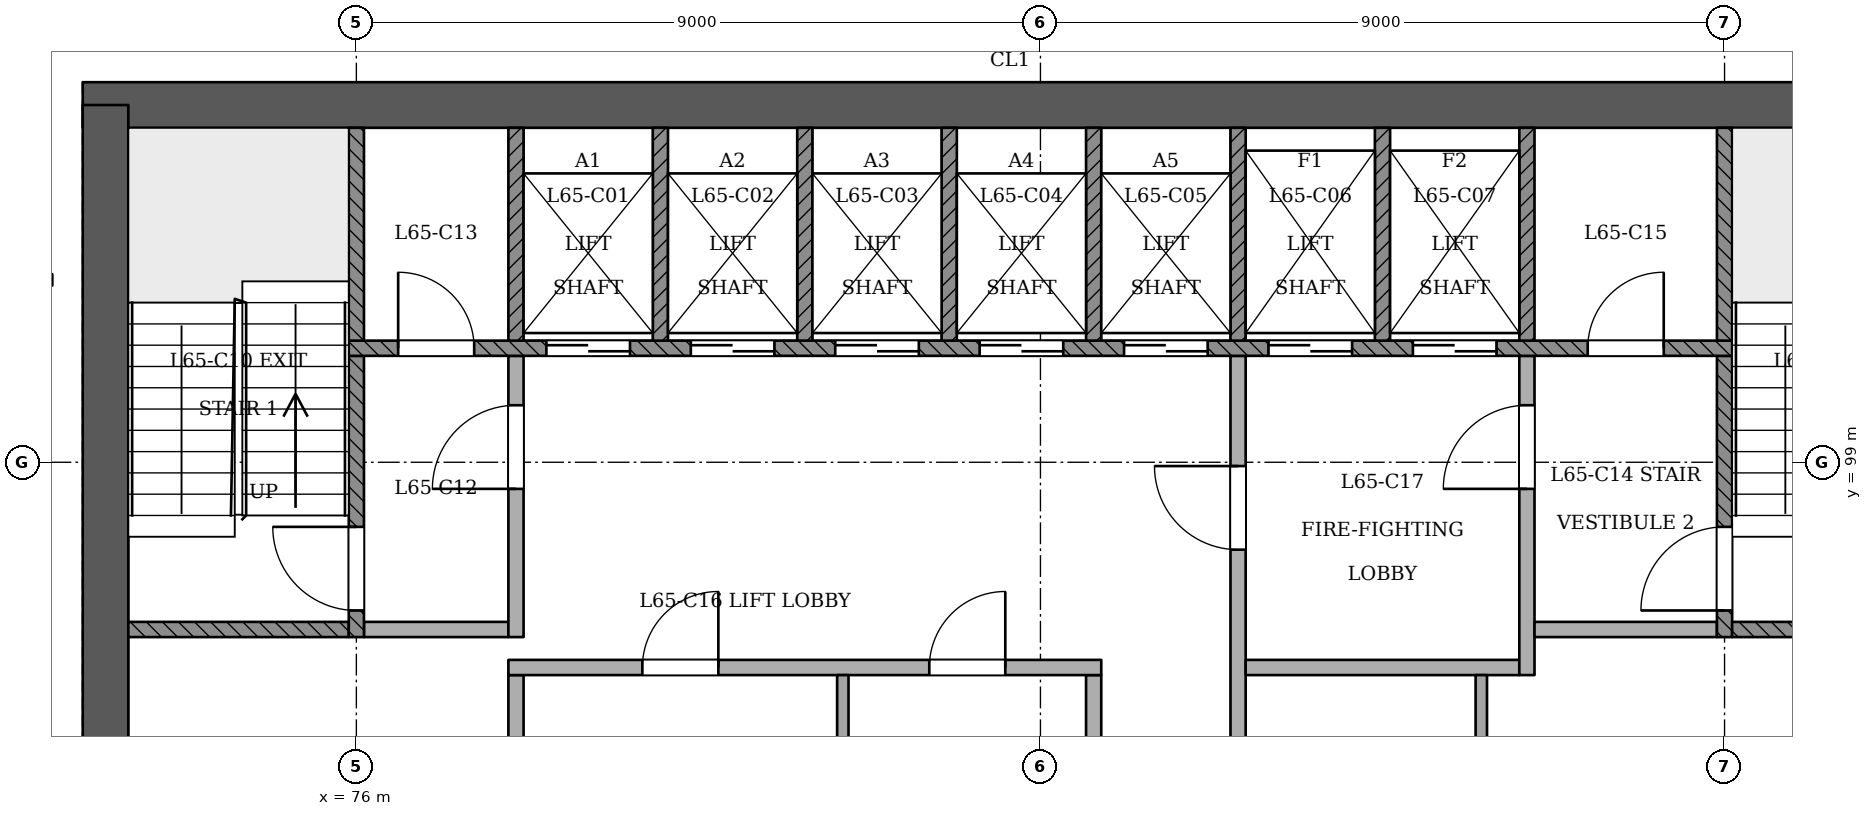
"""IFC4 building model, lengths in metres.
Left out: names, types, materials, properties, quantities, classifications, styles, units other than length and angle.
Written with IfcOpenShell. Run it as: python <this file> out.ifc"""

import sys

from ifc_helpers import new_model, si_unit, direction, frame, frame_2d, origin, place, context, subcontext, project, spatial, rectangle, extrude, element, fill, save


model = new_model("IFC4")
c1 = context("Model", 3, precision=1e-05, world=origin(), true_north=direction((0.0, 1.0)))
c2 = subcontext(c1, "Body", "Model", "MODEL_VIEW")
j1 = project(units=[si_unit("LENGTHUNIT", "METRE"), si_unit("PLANEANGLEUNIT", "RADIAN")], contexts=[c1])
p1 = place(None, origin())
s1 = spatial("IfcSite", under=j1, at=p1, CompositionType="ELEMENT")
p2 = place(p1, origin())
s2 = spatial("IfcBuilding", under=s1, at=p2, CompositionType="ELEMENT")
p3 = place(p2, frame((0.0, 0.0, 253.6)))
s3 = spatial("IfcBuildingStorey", under=s2, at=p3, CompositionType="ELEMENT", Elevation=253.6)
p4 = place(p3, frame((97.3, 103.7, 0.0), z_axis=(0.0, 0.0, 1.0), x_axis=(-1.0, 0.0, 0.0)))
e1 = element("IfcWall", 1, at=p4, inside=s3, PredefinedType="SHEAR", context=c2, shape_type="SweptSolid", body=[
    extrude(rectangle(XDim=24.9, YDim=0.6, at=frame_2d((12.45, 0.0))), origin(), (0.0, 0.0, 1.0), 3.6),
])
p5 = place(p3, frame((72.7, 103.7, 0.0), z_axis=(0.0, 0.0, 1.0), x_axis=(0.0, -1.0, 0.0)))
e2 = element("IfcWall", 2, at=p5, inside=s3, PredefinedType="SHEAR", context=c2, shape_type="SweptSolid", body=[
    extrude(rectangle(XDim=10.9, YDim=0.6, at=frame_2d((5.45, 0.0))), origin(), (0.0, 0.0, 1.0), 3.6),
])
p6 = place(p3, frame((72.0, 101.4, 0.0), z_axis=(0.0, 0.0, 1.0), x_axis=(-1.0, 0.0, 0.0)))
e3 = element("IfcWall", 3, at=p6, inside=s3, PredefinedType="PARTITIONING", context=c2, shape_type="SweptSolid", body=[
    extrude(rectangle(XDim=1.8, YDim=0.15, at=frame_2d((0.9, 0.0))), origin(), (0.0, 0.0, 1.0), 3.2),
])
p7 = place(p6, frame((0.54, 0.0, 0.0)))
e4 = element("IfcOpeningElement", 4, at=p7, cuts=e3, PredefinedType="OPENING", context=c2, shape_type="SweptSolid", body=[
    extrude(rectangle(XDim=1.0, YDim=2.1, at=frame_2d((0.5, 1.05))), frame((0.0, 0.085, 0.0), z_axis=(0.0, -1.0, 0.0), x_axis=(1.0, 0.0, 0.0)), (0.0, 0.0, 1.0), 0.171),
])
p8 = place(p3, frame((78.1, 93.4, 0.0), z_axis=(0.0, 0.0, 1.0), x_axis=(0.0, 1.0, 0.0)))
e5 = element("IfcWall", 5, at=p8, inside=s3, PredefinedType="PARTITIONING", context=c2, shape_type="SweptSolid", body=[
    extrude(rectangle(XDim=2.8, YDim=0.2, at=frame_2d((1.4, 0.0))), origin(), (0.0, 0.0, 1.0), 3.2),
])
p9 = place(p3, frame((82.4, 93.4, 0.0), z_axis=(0.0, 0.0, 1.0), x_axis=(0.0, 1.0, 0.0)))
e6 = element("IfcWall", 6, at=p9, inside=s3, PredefinedType="PARTITIONING", context=c2, shape_type="SweptSolid", body=[
    extrude(rectangle(XDim=2.8, YDim=0.15, at=frame_2d((1.4, 0.0))), origin(), (0.0, 0.0, 1.0), 3.2),
])
p10 = place(p3, frame((85.7, 93.4, 0.0), z_axis=(0.0, 0.0, 1.0), x_axis=(0.0, 1.0, 0.0)))
e7 = element("IfcWall", 7, at=p10, inside=s3, PredefinedType="PARTITIONING", context=c2, shape_type="SweptSolid", body=[
    extrude(rectangle(XDim=2.8, YDim=0.2, at=frame_2d((1.4, 0.0))), origin(), (0.0, 0.0, 1.0), 3.2),
])
p11 = place(p3, frame((87.6, 93.4, 0.0), z_axis=(0.0, 0.0, 1.0), x_axis=(0.0, 1.0, 0.0)))
e8 = element("IfcWall", 8, at=p11, inside=s3, PredefinedType="PARTITIONING", context=c2, shape_type="SweptSolid", body=[
    extrude(rectangle(XDim=7.0, YDim=0.2, at=frame_2d((3.5, 0.0))), origin(), (0.0, 0.0, 1.0), 3.2),
])
p12 = place(p11, frame((4.45, 0.0, 0.0)))
e9 = element("IfcOpeningElement", 9, at=p12, cuts=e8, PredefinedType="OPENING", context=c2, shape_type="SweptSolid", body=[
    extrude(rectangle(XDim=1.1, YDim=2.1, at=frame_2d((0.55, 1.05))), frame((0.0, 0.11, 0.0), z_axis=(0.0, -1.0, 0.0), x_axis=(1.0, 0.0, 0.0)), (0.0, 0.0, 1.0), 0.221),
])
p13 = place(p3, frame((90.8, 93.4, 0.0), z_axis=(0.0, 0.0, 1.0), x_axis=(0.0, 1.0, 0.0)))
e10 = element("IfcWall", 10, at=p13, inside=s3, PredefinedType="PARTITIONING", context=c2, shape_type="SweptSolid", body=[
    extrude(rectangle(XDim=2.8, YDim=0.15, at=frame_2d((1.4, 0.0))), origin(), (0.0, 0.0, 1.0), 3.2),
])
p14 = place(p3, frame((78.0, 96.3, 0.0), z_axis=(0.0, 0.0, 1.0), x_axis=(1.0, 0.0, 0.0)))
e11 = element("IfcWall", 11, at=p14, inside=s3, PredefinedType="PARTITIONING", context=c2, shape_type="SweptSolid", body=[
    extrude(rectangle(XDim=7.8, YDim=0.2, at=frame_2d((3.9, 0.0))), origin(), (0.0, 0.0, 1.0), 3.2),
])
p15 = place(p14, frame((1.762, 0.0, 0.0)))
e12 = element("IfcOpeningElement", 12, at=p15, cuts=e11, PredefinedType="OPENING", context=c2, shape_type="SweptSolid", body=[
    extrude(rectangle(XDim=1.0, YDim=2.1, at=frame_2d((0.5, 1.05))), frame((0.0, 0.11, 0.0), z_axis=(0.0, -1.0, 0.0), x_axis=(1.0, 0.0, 0.0)), (0.0, 0.0, 1.0), 0.221),
])
p16 = place(p14, frame((5.538, 0.0, 0.0)))
e13 = element("IfcOpeningElement", 13, at=p16, cuts=e11, PredefinedType="OPENING", context=c2, shape_type="SweptSolid", body=[
    extrude(rectangle(XDim=1.0, YDim=2.1, at=frame_2d((0.5, 1.05))), frame((0.0, 0.11, 0.0), z_axis=(0.0, -1.0, 0.0), x_axis=(1.0, 0.0, 0.0)), (0.0, 0.0, 1.0), 0.221),
])
p17 = place(p3, frame((87.7, 96.3, 0.0), z_axis=(0.0, 0.0, 1.0), x_axis=(1.0, 0.0, 0.0)))
e14 = element("IfcWall", 14, at=p17, inside=s3, PredefinedType="PARTITIONING", context=c2, shape_type="SweptSolid", body=[
    extrude(rectangle(XDim=3.6, YDim=0.2, at=frame_2d((1.8, 0.0))), origin(), (0.0, 0.0, 1.0), 3.2),
])
p18 = place(p3, frame((91.4, 96.2, 0.0), z_axis=(0.0, 0.0, 1.0), x_axis=(0.0, 1.0, 0.0)))
e15 = element("IfcWall", 15, at=p18, inside=s3, PredefinedType="PARTITIONING", context=c2, shape_type="SweptSolid", body=[
    extrude(rectangle(XDim=4.2, YDim=0.2, at=frame_2d((2.1, 0.0))), origin(), (0.0, 0.0, 1.0), 3.2),
])
p19 = place(p18, frame((2.45, 0.0, 0.0)))
e16 = element("IfcOpeningElement", 16, at=p19, cuts=e15, PredefinedType="OPENING", context=c2, shape_type="SweptSolid", body=[
    extrude(rectangle(XDim=1.1, YDim=2.1, at=frame_2d((0.55, 1.05))), frame((0.0, 0.11, 0.0), z_axis=(0.0, -1.0, 0.0), x_axis=(1.0, 0.0, 0.0)), (0.0, 0.0, 1.0), 0.221),
])
p20 = place(p3, frame((73.0, 96.8, 0.0), z_axis=(0.0, 0.0, 1.0), x_axis=(1.0, 0.0, 0.0)))
e17 = element("IfcWall", 17, at=p20, inside=s3, PredefinedType="SOLIDWALL", context=c2, shape_type="SweptSolid", body=[
    extrude(rectangle(XDim=2.9, YDim=0.2, at=frame_2d((1.45, 0.0))), origin(), (0.0, 0.0, 1.0), 3.2),
])
p21 = place(p3, frame((76.0, 96.7, 0.0), z_axis=(0.0, 0.0, 1.0), x_axis=(0.0, 1.0, 0.0)))
e18 = element("IfcWall", 18, at=p21, inside=s3, PredefinedType="SOLIDWALL", context=c2, shape_type="SweptSolid", body=[
    extrude(rectangle(XDim=3.7, YDim=0.2, at=frame_2d((1.85, 0.0))), origin(), (0.0, 0.0, 1.0), 3.2),
])
p22 = place(p21, frame((0.35, 0.0, 0.0)))
e19 = element("IfcOpeningElement", 19, at=p22, cuts=e18, PredefinedType="OPENING", context=c2, shape_type="SweptSolid", body=[
    extrude(rectangle(XDim=1.1, YDim=2.1, at=frame_2d((0.55, 1.05))), frame((0.0, 0.11, 0.0), z_axis=(0.0, -1.0, 0.0), x_axis=(1.0, 0.0, 0.0)), (0.0, 0.0, 1.0), 0.221),
])
p23 = place(p3, frame((76.1, 96.8, 0.0), z_axis=(0.0, 0.0, 1.0), x_axis=(1.0, 0.0, 0.0)))
e20 = element("IfcWall", 20, at=p23, inside=s3, PredefinedType="PARTITIONING", context=c2, shape_type="SweptSolid", body=[
    extrude(rectangle(XDim=1.9, YDim=0.2, at=frame_2d((0.95, 0.0))), origin(), (0.0, 0.0, 1.0), 3.2),
])
p24 = place(p3, frame((78.1, 96.7, 0.0), z_axis=(0.0, 0.0, 1.0), x_axis=(0.0, 1.0, 0.0)))
e21 = element("IfcWall", 21, at=p24, inside=s3, PredefinedType="PARTITIONING", context=c2, shape_type="SweptSolid", body=[
    extrude(rectangle(XDim=3.7, YDim=0.2, at=frame_2d((1.85, 0.0))), origin(), (0.0, 0.0, 1.0), 3.2),
])
p25 = place(p24, frame((1.95, 0.0, 0.0)))
e22 = element("IfcOpeningElement", 22, at=p25, cuts=e21, PredefinedType="OPENING", context=c2, shape_type="SweptSolid", body=[
    extrude(rectangle(XDim=1.1, YDim=2.1, at=frame_2d((0.55, 1.05))), frame((0.0, 0.11, 0.0), z_axis=(0.0, -1.0, 0.0), x_axis=(1.0, 0.0, 0.0)), (0.0, 0.0, 1.0), 0.221),
])
p26 = place(p3, frame((91.5, 96.8, 0.0), z_axis=(0.0, 0.0, 1.0), x_axis=(1.0, 0.0, 0.0)))
e23 = element("IfcWall", 23, at=p26, inside=s3, PredefinedType="PARTITIONING", context=c2, shape_type="SweptSolid", body=[
    extrude(rectangle(XDim=2.4, YDim=0.2, at=frame_2d((1.2, 0.0))), origin(), (0.0, 0.0, 1.0), 3.2),
])
p27 = place(p3, frame((94.0, 96.7, 0.0), z_axis=(0.0, 0.0, 1.0), x_axis=(0.0, 1.0, 0.0)))
e24 = element("IfcWall", 24, at=p27, inside=s3, PredefinedType="SOLIDWALL", context=c2, shape_type="SweptSolid", body=[
    extrude(rectangle(XDim=3.7, YDim=0.2, at=frame_2d((1.85, 0.0))), origin(), (0.0, 0.0, 1.0), 3.2),
])
p28 = place(p27, frame((0.35, 0.0, 0.0)))
e25 = element("IfcOpeningElement", 25, at=p28, cuts=e24, PredefinedType="OPENING", context=c2, shape_type="SweptSolid", body=[
    extrude(rectangle(XDim=1.1, YDim=2.1, at=frame_2d((0.55, 1.05))), frame((0.0, 0.11, 0.0), z_axis=(0.0, -1.0, 0.0), x_axis=(1.0, 0.0, 0.0)), (0.0, 0.0, 1.0), 0.221),
])
p29 = place(p3, frame((94.1, 96.8, 0.0), z_axis=(0.0, 0.0, 1.0), x_axis=(1.0, 0.0, 0.0)))
e26 = element("IfcWall", 26, at=p29, inside=s3, PredefinedType="SOLIDWALL", context=c2, shape_type="SweptSolid", body=[
    extrude(rectangle(XDim=2.9, YDim=0.2, at=frame_2d((1.45, 0.0))), origin(), (0.0, 0.0, 1.0), 3.2),
])
p30 = place(p3, frame((75.9, 100.5, 0.0), z_axis=(0.0, 0.0, 1.0), x_axis=(1.0, 0.0, 0.0)))
e27 = element("IfcWall", 27, at=p30, inside=s3, PredefinedType="SOLIDWALL", context=c2, shape_type="SweptSolid", body=[
    extrude(rectangle(XDim=18.2, YDim=0.2, at=frame_2d((9.1, 0.0))), origin(), (0.0, 0.0, 1.0), 3.2),
])
p31 = place(p30, frame((2.6, 0.0, 0.0)))
e28 = element("IfcOpeningElement", 28, at=p31, cuts=e27, PredefinedType="OPENING", context=c2, shape_type="SweptSolid", body=[
    extrude(rectangle(XDim=1.1, YDim=2.1, at=frame_2d((0.55, 1.05))), frame((0.0, 0.11, 0.0), z_axis=(0.0, -1.0, 0.0), x_axis=(1.0, 0.0, 0.0)), (0.0, 0.0, 1.0), 0.221),
])
p32 = place(p30, frame((4.5, 0.0, 0.0)))
e29 = element("IfcOpeningElement", 29, at=p32, cuts=e27, PredefinedType="OPENING", context=c2, shape_type="SweptSolid", body=[
    extrude(rectangle(XDim=1.1, YDim=2.1, at=frame_2d((0.55, 1.05))), frame((0.0, 0.11, 0.0), z_axis=(0.0, -1.0, 0.0), x_axis=(1.0, 0.0, 0.0)), (0.0, 0.0, 1.0), 0.221),
])
p33 = place(p30, frame((6.4, 0.0, 0.0)))
e30 = element("IfcOpeningElement", 30, at=p33, cuts=e27, PredefinedType="OPENING", context=c2, shape_type="SweptSolid", body=[
    extrude(rectangle(XDim=1.1, YDim=2.1, at=frame_2d((0.55, 1.05))), frame((0.0, 0.11, 0.0), z_axis=(0.0, -1.0, 0.0), x_axis=(1.0, 0.0, 0.0)), (0.0, 0.0, 1.0), 0.221),
])
p34 = place(p30, frame((8.3, 0.0, 0.0)))
e31 = element("IfcOpeningElement", 31, at=p34, cuts=e27, PredefinedType="OPENING", context=c2, shape_type="SweptSolid", body=[
    extrude(rectangle(XDim=1.1, YDim=2.1, at=frame_2d((0.55, 1.05))), frame((0.0, 0.11, 0.0), z_axis=(0.0, -1.0, 0.0), x_axis=(1.0, 0.0, 0.0)), (0.0, 0.0, 1.0), 0.221),
])
p35 = place(p30, frame((10.2, 0.0, 0.0)))
e32 = element("IfcOpeningElement", 32, at=p35, cuts=e27, PredefinedType="OPENING", context=c2, shape_type="SweptSolid", body=[
    extrude(rectangle(XDim=1.1, YDim=2.1, at=frame_2d((0.55, 1.05))), frame((0.0, 0.11, 0.0), z_axis=(0.0, -1.0, 0.0), x_axis=(1.0, 0.0, 0.0)), (0.0, 0.0, 1.0), 0.221),
])
p36 = place(p30, frame((12.1, 0.0, 0.0)))
e33 = element("IfcOpeningElement", 33, at=p36, cuts=e27, PredefinedType="OPENING", context=c2, shape_type="SweptSolid", body=[
    extrude(rectangle(XDim=1.1, YDim=2.1, at=frame_2d((0.55, 1.05))), frame((0.0, 0.11, 0.0), z_axis=(0.0, -1.0, 0.0), x_axis=(1.0, 0.0, 0.0)), (0.0, 0.0, 1.0), 0.221),
])
p37 = place(p30, frame((14.0, 0.0, 0.0)))
e34 = element("IfcOpeningElement", 34, at=p37, cuts=e27, PredefinedType="OPENING", context=c2, shape_type="SweptSolid", body=[
    extrude(rectangle(XDim=1.1, YDim=2.1, at=frame_2d((0.55, 1.05))), frame((0.0, 0.11, 0.0), z_axis=(0.0, -1.0, 0.0), x_axis=(1.0, 0.0, 0.0)), (0.0, 0.0, 1.0), 0.221),
])
p38 = place(p30, frame((0.65, 0.0, 0.0)))
e35 = element("IfcOpeningElement", 35, at=p38, cuts=e27, PredefinedType="OPENING", context=c2, shape_type="SweptSolid", body=[
    extrude(rectangle(XDim=1.0, YDim=2.1, at=frame_2d((0.5, 1.05))), frame((0.0, 0.11, 0.0), z_axis=(0.0, -1.0, 0.0), x_axis=(1.0, 0.0, 0.0)), (0.0, 0.0, 1.0), 0.221),
])
p39 = place(p30, frame((16.3, 0.0, 0.0)))
e36 = element("IfcOpeningElement", 36, at=p39, cuts=e27, PredefinedType="OPENING", context=c2, shape_type="SweptSolid", body=[
    extrude(rectangle(XDim=1.0, YDim=2.1, at=frame_2d((0.5, 1.05))), frame((0.0, 0.11, 0.0), z_axis=(0.0, -1.0, 0.0), x_axis=(1.0, 0.0, 0.0)), (0.0, 0.0, 1.0), 0.221),
])
for number, where, z_axis, x_axis in (
    (37, (76.0, 100.6, 0.0), (0.0, 0.0, 1.0), (0.0, 1.0, 0.0)),
    (38, (78.1, 100.6, 0.0), (0.0, 0.0, 1.0), (0.0, 1.0, 0.0)),
    (39, (80.0, 100.6, 0.0), (0.0, 0.0, 1.0), (0.0, 1.0, 0.0)),
    (40, (81.9, 100.6, 0.0), (0.0, 0.0, 1.0), (0.0, 1.0, 0.0)),
    (41, (83.8, 100.6, 0.0), (0.0, 0.0, 1.0), (0.0, 1.0, 0.0)),
    (42, (85.7, 100.6, 0.0), (0.0, 0.0, 1.0), (0.0, 1.0, 0.0)),
    (43, (87.6, 100.6, 0.0), (0.0, 0.0, 1.0), (0.0, 1.0, 0.0)),
    (44, (89.5, 100.6, 0.0), (0.0, 0.0, 1.0), (0.0, 1.0, 0.0)),
    (45, (91.4, 100.6, 0.0), (0.0, 0.0, 1.0), (0.0, 1.0, 0.0)),
    (46, (94.0, 100.6, 0.0), (0.0, 0.0, 1.0), (0.0, 1.0, 0.0)),
):
    element("IfcWall", number, at=place(p3, frame(where, z_axis=z_axis, x_axis=x_axis)), inside=s3, PredefinedType="SOLIDWALL", context=c2, shape_type="SweptSolid", body=[
        extrude(rectangle(XDim=2.8, YDim=0.2, at=frame_2d((1.4, 0.0))), origin(), (0.0, 0.0, 1.0), 3.2),
    ])
p40 = place(p31, origin())
e47 = element("IfcDoor", 47, at=p40, inside=s3, OperationType="SLIDING_TO_RIGHT", PredefinedType="NOTDEFINED", context=c2, shape_type="SweptSolid", body=[
    extrude(rectangle(XDim=1.1, YDim=2.1, at=frame_2d((0.55, 1.05))), frame((0.0, 0.025, 0.0), z_axis=(0.0, -1.0, 0.0), x_axis=(1.0, 0.0, 0.0)), (0.0, 0.0, 1.0), 0.05),
])
fill(e28, e47)
p41 = place(p32, origin())
e48 = element("IfcDoor", 48, at=p41, inside=s3, OperationType="SLIDING_TO_LEFT", PredefinedType="NOTDEFINED", context=c2, shape_type="SweptSolid", body=[
    extrude(rectangle(XDim=1.1, YDim=2.1, at=frame_2d((0.55, 1.05))), frame((0.0, 0.025, 0.0), z_axis=(0.0, -1.0, 0.0), x_axis=(1.0, 0.0, 0.0)), (0.0, 0.0, 1.0), 0.05),
])
fill(e29, e48)
p42 = place(p33, origin())
e49 = element("IfcDoor", 49, at=p42, inside=s3, OperationType="SLIDING_TO_RIGHT", PredefinedType="NOTDEFINED", context=c2, shape_type="SweptSolid", body=[
    extrude(rectangle(XDim=1.1, YDim=2.1, at=frame_2d((0.55, 1.05))), frame((0.0, 0.025, 0.0), z_axis=(0.0, -1.0, 0.0), x_axis=(1.0, 0.0, 0.0)), (0.0, 0.0, 1.0), 0.05),
])
fill(e30, e49)
p43 = place(p34, origin())
e50 = element("IfcDoor", 50, at=p43, inside=s3, OperationType="SLIDING_TO_LEFT", PredefinedType="NOTDEFINED", context=c2, shape_type="SweptSolid", body=[
    extrude(rectangle(XDim=1.1, YDim=2.1, at=frame_2d((0.55, 1.05))), frame((0.0, 0.025, 0.0), z_axis=(0.0, -1.0, 0.0), x_axis=(1.0, 0.0, 0.0)), (0.0, 0.0, 1.0), 0.05),
])
fill(e31, e50)
p44 = place(p35, origin())
e51 = element("IfcDoor", 51, at=p44, inside=s3, OperationType="SLIDING_TO_RIGHT", PredefinedType="NOTDEFINED", context=c2, shape_type="SweptSolid", body=[
    extrude(rectangle(XDim=1.1, YDim=2.1, at=frame_2d((0.55, 1.05))), frame((0.0, 0.025, 0.0), z_axis=(0.0, -1.0, 0.0), x_axis=(1.0, 0.0, 0.0)), (0.0, 0.0, 1.0), 0.05),
])
fill(e32, e51)
p45 = place(p36, origin())
e52 = element("IfcDoor", 52, at=p45, inside=s3, OperationType="SLIDING_TO_RIGHT", PredefinedType="NOTDEFINED", context=c2, shape_type="SweptSolid", body=[
    extrude(rectangle(XDim=1.1, YDim=2.1, at=frame_2d((0.55, 1.05))), frame((0.0, 0.025, 0.0), z_axis=(0.0, -1.0, 0.0), x_axis=(1.0, 0.0, 0.0)), (0.0, 0.0, 1.0), 0.05),
])
fill(e33, e52)
p46 = place(p37, origin())
e53 = element("IfcDoor", 53, at=p46, inside=s3, OperationType="SLIDING_TO_LEFT", PredefinedType="NOTDEFINED", context=c2, shape_type="SweptSolid", body=[
    extrude(rectangle(XDim=1.1, YDim=2.1, at=frame_2d((0.55, 1.05))), frame((0.0, 0.025, 0.0), z_axis=(0.0, -1.0, 0.0), x_axis=(1.0, 0.0, 0.0)), (0.0, 0.0, 1.0), 0.05),
])
fill(e34, e53)
p47 = place(p22, origin())
e54 = element("IfcDoor", 54, at=p47, inside=s3, OperationType="SINGLE_SWING_RIGHT", PredefinedType="NOTDEFINED", context=c2, shape_type="SweptSolid", body=[
    extrude(rectangle(XDim=1.1, YDim=2.1, at=frame_2d((0.55, 1.05))), frame((0.0, 0.025, 0.0), z_axis=(0.0, -1.0, 0.0), x_axis=(1.0, 0.0, 0.0)), (0.0, 0.0, 1.0), 0.05),
])
fill(e19, e54)
p48 = place(p28, origin())
e55 = element("IfcDoor", 55, at=p48, inside=s3, OperationType="SINGLE_SWING_LEFT", PredefinedType="NOTDEFINED", context=c2, shape_type="SweptSolid", body=[
    extrude(rectangle(XDim=1.1, YDim=2.1, at=frame_2d((0.55, 1.05))), frame((0.0, 0.025, 0.0), z_axis=(0.0, -1.0, 0.0), x_axis=(1.0, 0.0, 0.0)), (0.0, 0.0, 1.0), 0.05),
])
fill(e25, e55)
p49 = place(p25, origin())
e56 = element("IfcDoor", 56, at=p49, inside=s3, OperationType="SINGLE_SWING_LEFT", PredefinedType="NOTDEFINED", context=c2, shape_type="SweptSolid", body=[
    extrude(rectangle(XDim=1.1, YDim=2.1, at=frame_2d((0.55, 1.05))), frame((0.0, 0.025, 0.0), z_axis=(0.0, -1.0, 0.0), x_axis=(1.0, 0.0, 0.0)), (0.0, 0.0, 1.0), 0.05),
])
fill(e22, e56)
p50 = place(p12, origin())
e57 = element("IfcDoor", 57, at=p50, inside=s3, OperationType="SINGLE_SWING_RIGHT", PredefinedType="NOTDEFINED", context=c2, shape_type="SweptSolid", body=[
    extrude(rectangle(XDim=1.1, YDim=2.1, at=frame_2d((0.55, 1.05))), frame((0.0, 0.025, 0.0), z_axis=(0.0, -1.0, 0.0), x_axis=(1.0, 0.0, 0.0)), (0.0, 0.0, 1.0), 0.05),
])
fill(e9, e57)
p51 = place(p19, origin())
e58 = element("IfcDoor", 58, at=p51, inside=s3, OperationType="SINGLE_SWING_LEFT", PredefinedType="NOTDEFINED", context=c2, shape_type="SweptSolid", body=[
    extrude(rectangle(XDim=1.1, YDim=2.1, at=frame_2d((0.55, 1.05))), frame((0.0, 0.025, 0.0), z_axis=(0.0, -1.0, 0.0), x_axis=(1.0, 0.0, 0.0)), (0.0, 0.0, 1.0), 0.05),
])
fill(e16, e58)
p52 = place(p38, origin())
e59 = element("IfcDoor", 59, at=p52, inside=s3, OperationType="SINGLE_SWING_LEFT", PredefinedType="NOTDEFINED", context=c2, shape_type="SweptSolid", body=[
    extrude(rectangle(XDim=1.0, YDim=2.1, at=frame_2d((0.5, 1.05))), frame((0.0, 0.025, 0.0), z_axis=(0.0, -1.0, 0.0), x_axis=(1.0, 0.0, 0.0)), (0.0, 0.0, 1.0), 0.05),
])
fill(e35, e59)
p53 = place(p39, origin())
e60 = element("IfcDoor", 60, at=p53, inside=s3, OperationType="SINGLE_SWING_RIGHT", PredefinedType="NOTDEFINED", context=c2, shape_type="SweptSolid", body=[
    extrude(rectangle(XDim=1.0, YDim=2.1, at=frame_2d((0.5, 1.05))), frame((0.0, 0.025, 0.0), z_axis=(0.0, -1.0, 0.0), x_axis=(1.0, 0.0, 0.0)), (0.0, 0.0, 1.0), 0.05),
])
fill(e36, e60)
p54 = place(p15, origin())
e61 = element("IfcDoor", 61, at=p54, inside=s3, OperationType="SINGLE_SWING_RIGHT", PredefinedType="NOTDEFINED", context=c2, shape_type="SweptSolid", body=[
    extrude(rectangle(XDim=1.0, YDim=2.1, at=frame_2d((0.5, 1.05))), frame((0.0, 0.025, 0.0), z_axis=(0.0, -1.0, 0.0), x_axis=(1.0, 0.0, 0.0)), (0.0, 0.0, 1.0), 0.05),
])
fill(e12, e61)
p55 = place(p16, origin())
e62 = element("IfcDoor", 62, at=p55, inside=s3, OperationType="SINGLE_SWING_RIGHT", PredefinedType="NOTDEFINED", context=c2, shape_type="SweptSolid", body=[
    extrude(rectangle(XDim=1.0, YDim=2.1, at=frame_2d((0.5, 1.05))), frame((0.0, 0.025, 0.0), z_axis=(0.0, -1.0, 0.0), x_axis=(1.0, 0.0, 0.0)), (0.0, 0.0, 1.0), 0.05),
])
fill(e13, e62)
save(model, sys.argv[1])
